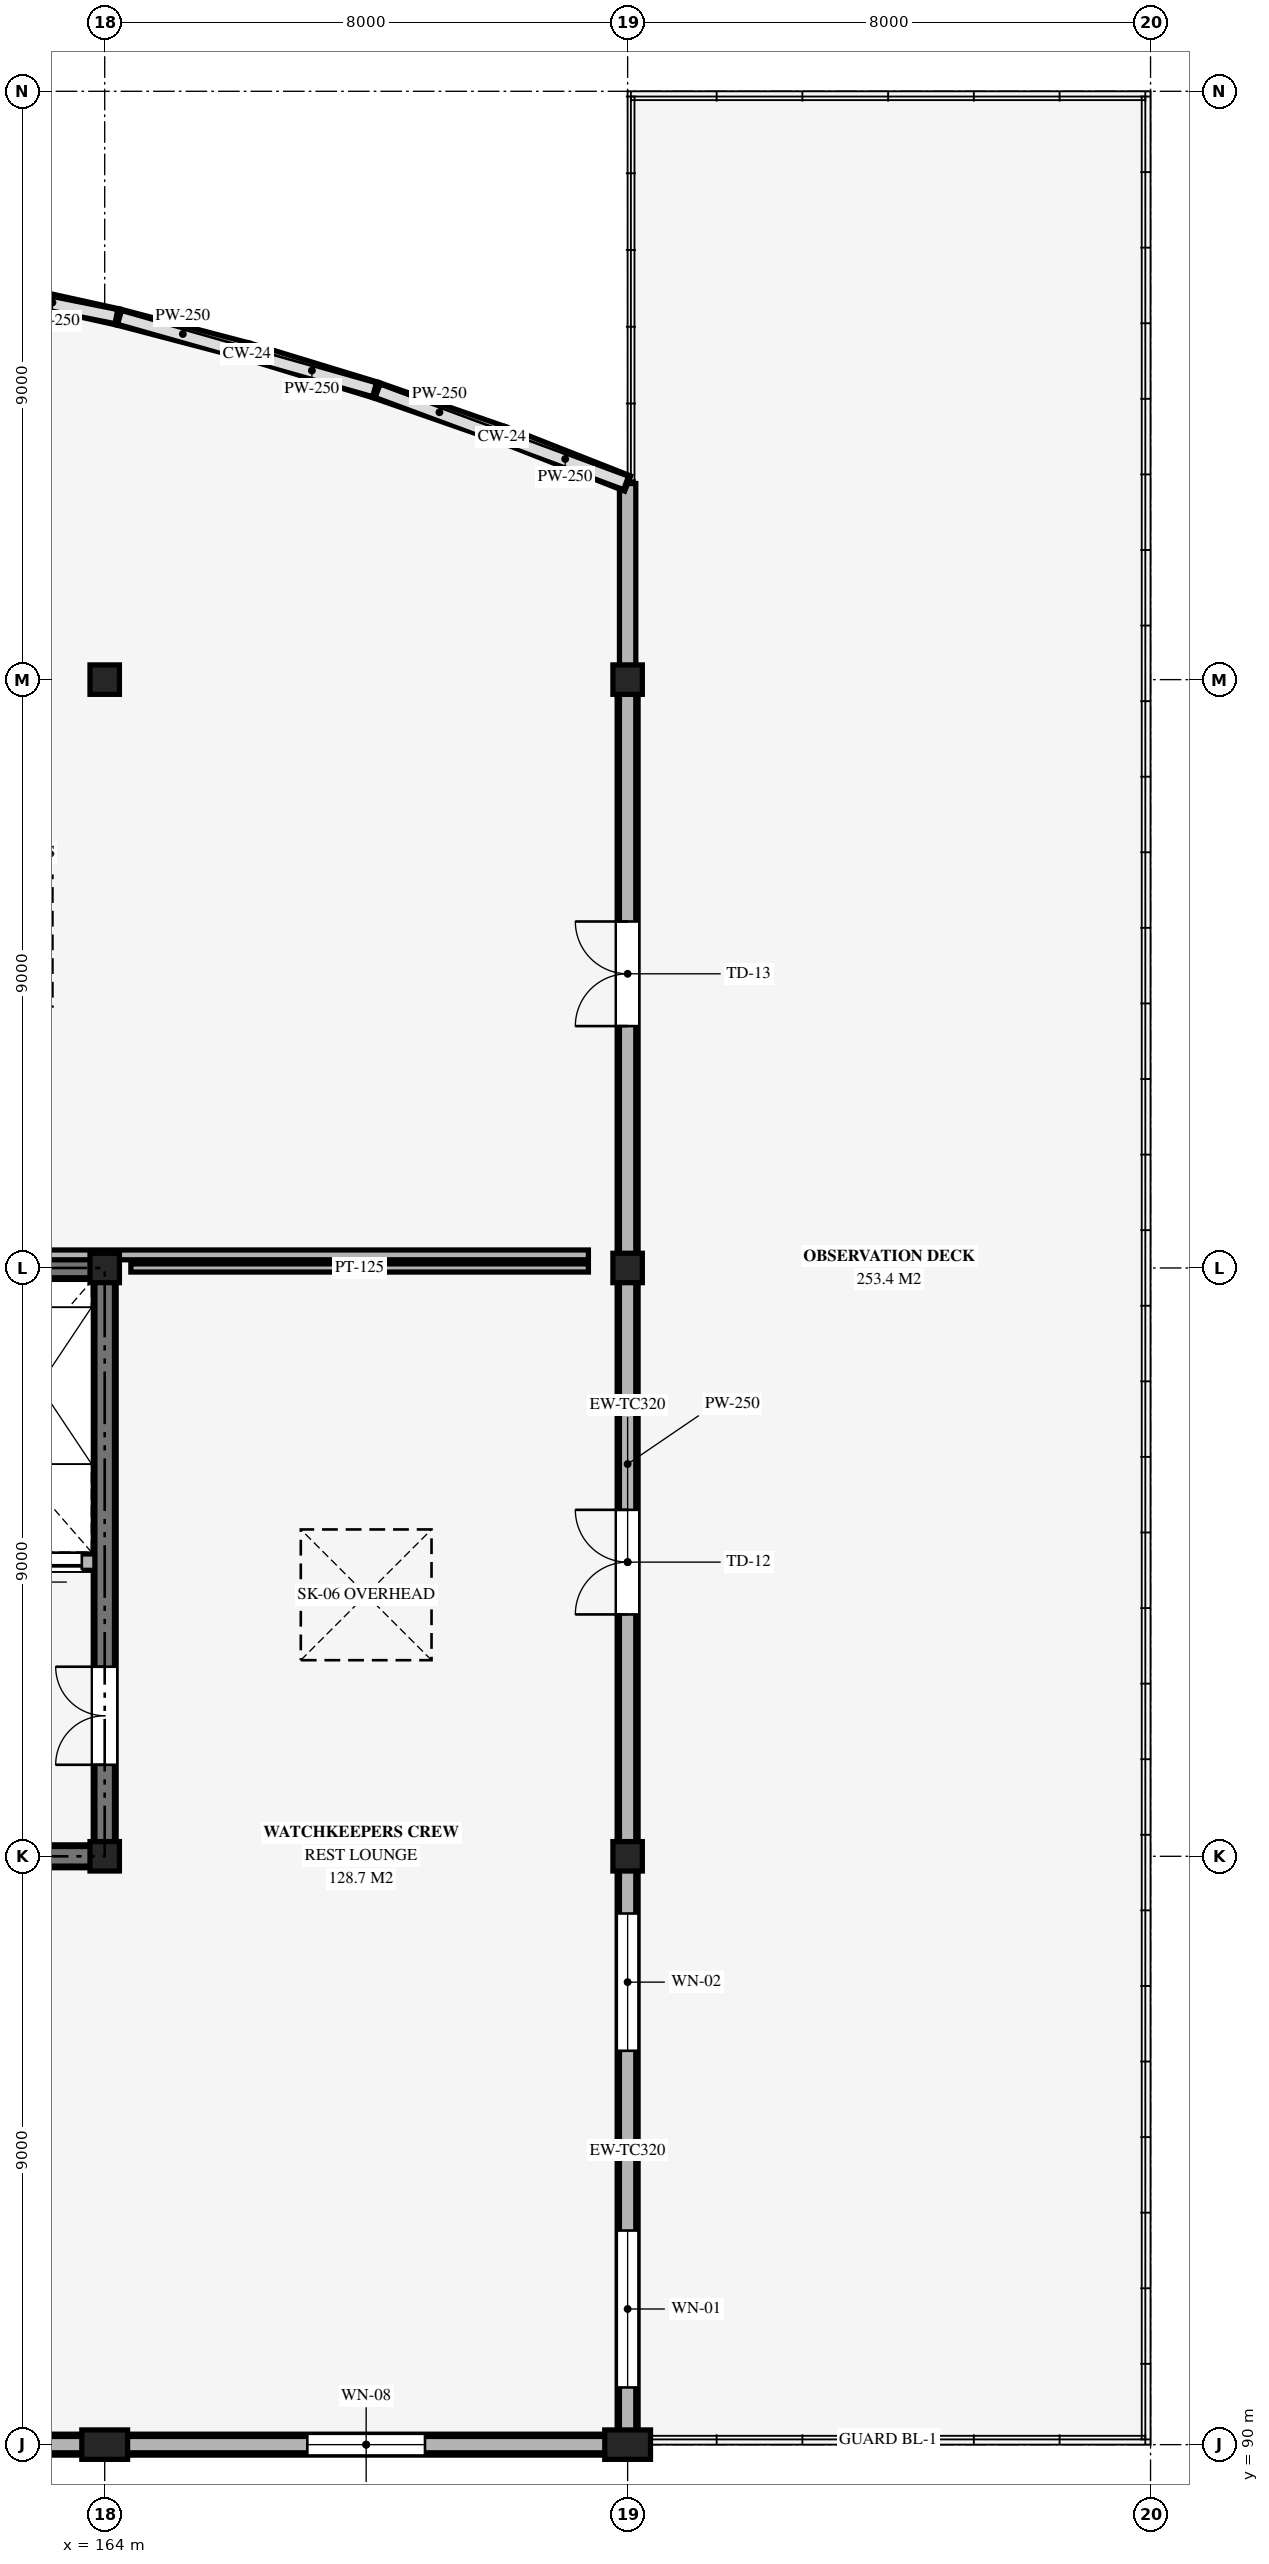
"""IFC4 building model, lengths in metres.
Left out: names, types, materials, properties, quantities, classifications, styles, units other than length and angle.
Written with IfcOpenShell. Run it as: python <this file> out.ifc"""

import sys

from ifc_helpers import new_model, si_unit, direction, frame, frame_2d, origin, origin_2d, place, context, subcontext, project, spatial, rectangle, extrude, element, fill, save


model = new_model("IFC4")
c1 = context("Model", 3, precision=1e-05, world=origin(), true_north=direction((0.0, 1.0)))
c2 = subcontext(c1, "Body", "Model", "MODEL_VIEW")
j1 = project(units=[si_unit("LENGTHUNIT", "METRE"), si_unit("PLANEANGLEUNIT", "RADIAN")], contexts=[c1])
p1 = place(None, origin())
s1 = spatial("IfcSite", under=j1, at=p1, CompositionType="ELEMENT")
p2 = place(p1, origin())
s2 = spatial("IfcBuilding", under=s1, at=p2, CompositionType="ELEMENT")
p3 = place(p2, frame((0.0, 0.0, 23.7)))
s3 = spatial("IfcBuildingStorey", under=s2, at=p3, CompositionType="ELEMENT", Elevation=23.7)
p4 = place(p3, frame((164.0, 90.0, 0.0), z_axis=(0.0, 0.0, 1.0), x_axis=(0.0, 1.0, 0.0)))
e1 = element("IfcColumn", 1, at=p4, inside=s3, PredefinedType="PILASTER", context=c2, shape_type="SweptSolid", body=[
    extrude(rectangle(XDim=0.45, YDim=0.7, at=origin_2d()), origin(), (0.0, 0.0, 1.0), 4.04),
])
for number, where, z_axis, x_axis in (
    (2, (164.0, 99.0, 0.0), (0.0, 0.0, 1.0), (1.0, 0.0, 0.0)),
    (3, (164.0, 108.0, 0.0), (0.0, 0.0, 1.0), (1.0, 0.0, 0.0)),
    (4, (164.0, 117.0, 0.0), (0.0, 0.0, 1.0), (1.0, 0.0, 0.0)),
):
    element("IfcColumn", number, at=place(p3, frame(where, z_axis=z_axis, x_axis=x_axis)), inside=s3, PredefinedType="COLUMN", context=c2, shape_type="SweptSolid", body=[
        extrude(rectangle(XDim=0.45, YDim=0.45, at=origin_2d()), origin(), (0.0, 0.0, 1.0), 4.04),
    ])
p5 = place(p3, frame((172.0, 90.0, 0.0), z_axis=(0.0, 0.0, 1.0), x_axis=(0.0, 1.0, 0.0)))
e5 = element("IfcColumn", 5, at=p5, inside=s3, PredefinedType="PILASTER", context=c2, shape_type="SweptSolid", body=[
    extrude(rectangle(XDim=0.45, YDim=0.7, at=origin_2d()), origin(), (0.0, 0.0, 1.0), 4.04),
])
for number, where, z_axis, x_axis in (
    (6, (172.0, 99.0, 0.0), (0.0, 0.0, 1.0), (1.0, 0.0, 0.0)),
    (7, (172.0, 108.0, 0.0), (0.0, 0.0, 1.0), (1.0, 0.0, 0.0)),
    (8, (172.0, 117.0, 0.0), (0.0, 0.0, 1.0), (1.0, 0.0, 0.0)),
):
    element("IfcColumn", number, at=place(p3, frame(where, z_axis=z_axis, x_axis=x_axis)), inside=s3, PredefinedType="COLUMN", context=c2, shape_type="SweptSolid", body=[
        extrude(rectangle(XDim=0.45, YDim=0.45, at=origin_2d()), origin(), (0.0, 0.0, 1.0), 4.04),
    ])
p6 = place(p3, frame((172.0, 90.225, 0.0), z_axis=(0.0, 0.0, 1.0), x_axis=(0.0, 1.0, 0.0)))
e9 = element("IfcWall", 9, at=p6, inside=s3, PredefinedType="SOLIDWALL", context=c2, shape_type="SweptSolid", body=[
    extrude(rectangle(XDim=8.55, YDim=0.32, at=frame_2d((4.275, 0.0))), origin(), (0.0, 0.0, 1.0), 3.98),
])
p7 = place(p6, frame((0.65, 0.0, 0.95)))
e10 = element("IfcOpeningElement", 10, at=p7, cuts=e9, PredefinedType="OPENING", context=c2, shape_type="SweptSolid", body=[
    extrude(rectangle(XDim=2.4, YDim=2.2, at=frame_2d((1.2, 1.1))), frame((0.0, 0.17, 0.0), z_axis=(0.0, -1.0, 0.0), x_axis=(1.0, 0.0, 0.0)), (0.0, 0.0, 1.0), 0.34),
])
p8 = place(p6, frame((5.8, 0.0, 0.95)))
e11 = element("IfcOpeningElement", 11, at=p8, cuts=e9, PredefinedType="OPENING", context=c2, shape_type="SweptSolid", body=[
    extrude(rectangle(XDim=2.1, YDim=2.2, at=frame_2d((1.05, 1.1))), frame((0.0, 0.17, 0.0), z_axis=(0.0, -1.0, 0.0), x_axis=(1.0, 0.0, 0.0)), (0.0, 0.0, 1.0), 0.34),
])
p9 = place(p3, frame((172.0, 99.225, 0.0), z_axis=(0.0, 0.0, 1.0), x_axis=(0.0, 1.0, 0.0)))
e12 = element("IfcWall", 12, at=p9, inside=s3, PredefinedType="SOLIDWALL", context=c2, shape_type="SweptSolid", body=[
    extrude(rectangle(XDim=8.55, YDim=0.32, at=frame_2d((4.275, 0.0))), origin(), (0.0, 0.0, 1.0), 3.98),
])
p10 = place(p9, frame((3.475, 0.0, 0.0)))
e13 = element("IfcOpeningElement", 13, at=p10, cuts=e12, PredefinedType="OPENING", context=c2, shape_type="SweptSolid", body=[
    extrude(rectangle(XDim=1.6, YDim=2.2, at=frame_2d((0.8, 1.1))), frame((0.0, 0.17, 0.0), z_axis=(0.0, -1.0, 0.0), x_axis=(1.0, 0.0, 0.0)), (0.0, 0.0, 1.0), 0.34),
])
p11 = place(p3, frame((172.0, 108.225, 0.0), z_axis=(0.0, 0.0, 1.0), x_axis=(0.0, 1.0, 0.0)))
e14 = element("IfcWall", 14, at=p11, inside=s3, PredefinedType="SOLIDWALL", context=c2, shape_type="SweptSolid", body=[
    extrude(rectangle(XDim=8.55, YDim=0.32, at=frame_2d((4.275, 0.0))), origin(), (0.0, 0.0, 1.0), 3.98),
])
p12 = place(p11, frame((3.475, 0.0, 0.0)))
e15 = element("IfcOpeningElement", 15, at=p12, cuts=e14, PredefinedType="OPENING", context=c2, shape_type="SweptSolid", body=[
    extrude(rectangle(XDim=1.6, YDim=2.2, at=frame_2d((0.8, 1.1))), frame((0.0, 0.17, 0.0), z_axis=(0.0, -1.0, 0.0), x_axis=(1.0, 0.0, 0.0)), (0.0, 0.0, 1.0), 0.34),
])
p13 = place(p3, frame((163.65, 90.0, 0.0), z_axis=(0.0, 0.0, 1.0), x_axis=(-1.0, 0.0, 0.0)))
e16 = element("IfcWall", 16, at=p13, inside=s3, PredefinedType="SOLIDWALL", context=c2, shape_type="SweptSolid", body=[
    extrude(rectangle(XDim=7.3, YDim=0.32, at=frame_2d((3.65, 0.0))), origin(), (0.0, 0.0, 1.0), 3.98),
])
p14 = place(p13, frame((2.6, 0.0, 1.0)))
e17 = element("IfcOpeningElement", 17, at=p14, cuts=e16, PredefinedType="OPENING", context=c2, shape_type="SweptSolid", body=[
    extrude(rectangle(XDim=2.1, YDim=1.8, at=frame_2d((1.05, 0.9))), frame((0.0, 0.17, 0.0), z_axis=(0.0, -1.0, 0.0), x_axis=(1.0, 0.0, 0.0)), (0.0, 0.0, 1.0), 0.34),
])
p15 = place(p3, frame((171.65, 90.0, 0.0), z_axis=(0.0, 0.0, 1.0), x_axis=(-1.0, 0.0, 0.0)))
e18 = element("IfcWall", 18, at=p15, inside=s3, PredefinedType="SOLIDWALL", context=c2, shape_type="SweptSolid", body=[
    extrude(rectangle(XDim=7.3, YDim=0.32, at=frame_2d((3.65, 0.0))), origin(), (0.0, 0.0, 1.0), 3.98),
])
p16 = place(p15, frame((2.75, 0.0, 1.0)))
e19 = element("IfcOpeningElement", 19, at=p16, cuts=e18, PredefinedType="OPENING", context=c2, shape_type="SweptSolid", body=[
    extrude(rectangle(XDim=1.8, YDim=1.8, at=frame_2d((0.9, 0.9))), frame((0.0, 0.17, 0.0), z_axis=(0.0, -1.0, 0.0), x_axis=(1.0, 0.0, 0.0)), (0.0, 0.0, 1.0), 0.34),
])
p17 = place(p3, frame((120.2, 90.0, 4.2), z_axis=(0.0, 0.0, 1.0), x_axis=(1.0, 0.0, 0.0)))
e20 = element("IfcWall", 20, at=p17, inside=s3, PredefinedType="PARAPET", context=c2, shape_type="SweptSolid", body=[
    extrude(rectangle(XDim=51.8, YDim=0.25, at=frame_2d((25.9, 0.0))), origin(), (0.0, 0.0, 1.0), 1.35),
])
p18 = place(p3, frame((172.0, 90.0, 4.2), z_axis=(0.0, 0.0, 1.0), x_axis=(0.0, 1.0, 0.0)))
e21 = element("IfcWall", 21, at=p18, inside=s3, PredefinedType="PARAPET", context=c2, shape_type="SweptSolid", body=[
    extrude(rectangle(XDim=30.0, YDim=0.25, at=frame_2d((15.0, 0.0))), origin(), (0.0, 0.0, 1.0), 1.35),
])
for number, where, z_axis, x_axis in (
    (22, (172.0, 120.0, 4.2), (0.0, 0.0, 1.0), (-0.93, 0.366, 0.0)),
    (23, (170.09, 120.752, 4.2), (0.0, 0.0, 1.0), (-0.944, 0.329, 0.0)),
):
    element("IfcWall", number, at=place(p3, frame(where, z_axis=z_axis, x_axis=x_axis)), inside=s3, PredefinedType="PARAPET", context=c2, shape_type="SweptSolid", body=[
        extrude(rectangle(XDim=2.052, YDim=0.25, at=frame_2d((1.026, 0.0))), origin(), (0.0, 0.0, 1.0), 1.35),
    ])
p19 = place(p3, frame((168.152, 121.428, 4.2), z_axis=(0.0, 0.0, 1.0), x_axis=(-0.956490827553, 0.291762397864, 0.0)))
e24 = element("IfcWall", 24, at=p19, inside=s3, PredefinedType="PARAPET", context=c2, shape_type="SweptSolid", body=[
    extrude(rectangle(XDim=2.053, YDim=0.25, at=frame_2d((1.027, 0.0))), origin(), (0.0, 0.0, 1.0), 1.35),
])
p20 = place(p3, frame((166.188, 122.027, 4.2), z_axis=(0.0, 0.0, 1.0), x_axis=(-0.967242284582, 0.253855003726, 0.0)))
e25 = element("IfcWall", 25, at=p20, inside=s3, PredefinedType="PARAPET", context=c2, shape_type="SweptSolid", body=[
    extrude(rectangle(XDim=2.052, YDim=0.25, at=frame_2d((1.026, 0.0))), origin(), (0.0, 0.0, 1.0), 1.35),
])
p21 = place(p3, frame((164.203, 122.548, 4.2), z_axis=(0.0, 0.0, 1.0), x_axis=(-0.976560545795, 0.215242886981, 0.0)))
e26 = element("IfcWall", 26, at=p21, inside=s3, PredefinedType="PARAPET", context=c2, shape_type="SweptSolid", body=[
    extrude(rectangle(XDim=2.053, YDim=0.25, at=frame_2d((1.026, 0.0))), origin(), (0.0, 0.0, 1.0), 1.35),
])
for number, where, z_axis, x_axis in (
    (27, (156.0, 99.0, 0.0), (0.0, 0.0, 1.0), (1.0, 0.0, 0.0)),
    (28, (156.0, 108.0, 0.0), (0.0, 0.0, 1.0), (1.0, 0.0, 0.0)),
):
    element("IfcWall", number, at=place(p3, frame(where, z_axis=z_axis, x_axis=x_axis)), inside=s3, PredefinedType="SHEAR", context=c2, shape_type="SweptSolid", body=[
        extrude(rectangle(XDim=8.0, YDim=0.35, at=frame_2d((4.0, 0.0))), origin(), (0.0, 0.0, 1.0), 3.98),
    ])
p22 = place(p3, frame((164.0, 99.0, 0.0), z_axis=(0.0, 0.0, 1.0), x_axis=(0.0, 1.0, 0.0)))
e29 = element("IfcWall", 29, at=p22, inside=s3, PredefinedType="SHEAR", context=c2, shape_type="SweptSolid", body=[
    extrude(rectangle(XDim=9.0, YDim=0.35, at=frame_2d((4.5, 0.0))), origin(), (0.0, 0.0, 1.0), 3.98),
])
p23 = place(p22, frame((1.4, 0.0, 0.0)))
e30 = element("IfcOpeningElement", 30, at=p23, cuts=e29, PredefinedType="OPENING", context=c2, shape_type="SweptSolid", body=[
    extrude(rectangle(XDim=1.5, YDim=2.2, at=frame_2d((0.75, 1.1))), frame((0.0, 0.185, 0.0), z_axis=(0.0, -1.0, 0.0), x_axis=(1.0, 0.0, 0.0)), (0.0, 0.0, 1.0), 0.37),
])
p24 = place(p3, frame((164.0, 103.5, 0.0), z_axis=(0.0, 0.0, 1.0), x_axis=(-1.0, 0.0, 0.0)))
e31 = element("IfcWall", 31, at=p24, inside=s3, PredefinedType="SOLIDWALL", context=c2, shape_type="SweptSolid", body=[
    extrude(rectangle(XDim=4.0, YDim=0.25, at=frame_2d((2.0, 0.0))), origin(), (0.0, 0.0, 1.0), 3.25),
])
p25 = place(p24, frame((0.35, 0.0, 0.0)))
e32 = element("IfcOpeningElement", 32, at=p25, cuts=e31, PredefinedType="OPENING", context=c2, shape_type="SweptSolid", body=[
    extrude(rectangle(XDim=1.3, YDim=2.25, at=frame_2d((0.65, 1.125))), frame((0.0, 0.135, 0.0), z_axis=(0.0, -1.0, 0.0), x_axis=(1.0, 0.0, 0.0)), (0.0, 0.0, 1.0), 0.27),
])
p26 = place(p24, frame((2.25, 0.0, 0.0)))
e33 = element("IfcOpeningElement", 33, at=p26, cuts=e31, PredefinedType="OPENING", context=c2, shape_type="SweptSolid", body=[
    extrude(rectangle(XDim=1.2, YDim=2.2, at=frame_2d((0.6, 1.1))), frame((0.0, 0.135, 0.0), z_axis=(0.0, -1.0, 0.0), x_axis=(1.0, 0.0, 0.0)), (0.0, 0.0, 1.0), 0.27),
])
for number, where, z_axis, x_axis in (
    (34, (156.0, 99.0, 3.98), (0.0, 0.0, 1.0), (1.0, 0.0, 0.0)),
    (35, (156.0, 108.0, 3.98), (0.0, 0.0, 1.0), (1.0, 0.0, 0.0)),
):
    element("IfcWall", number, at=place(p3, frame(where, z_axis=z_axis, x_axis=x_axis)), inside=s3, PredefinedType="SHEAR", context=c2, shape_type="SweptSolid", body=[
        extrude(rectangle(XDim=8.0, YDim=0.3, at=frame_2d((4.0, 0.0))), origin(), (0.0, 0.0, 1.0), 1.84),
    ])
p27 = place(p3, frame((164.0, 99.0, 3.98), z_axis=(0.0, 0.0, 1.0), x_axis=(0.0, 1.0, 0.0)))
e36 = element("IfcWall", 36, at=p27, inside=s3, PredefinedType="SHEAR", context=c2, shape_type="SweptSolid", body=[
    extrude(rectangle(XDim=9.0, YDim=0.3, at=frame_2d((4.5, 0.0))), origin(), (0.0, 0.0, 1.0), 1.84),
])
p28 = place(p3, frame((132.6, 108.2, 0.0), z_axis=(0.0, 0.0, 1.0), x_axis=(1.0, 0.0, 0.0)))
e37 = element("IfcWall", 37, at=p28, inside=s3, PredefinedType="PARTITIONING", context=c2, shape_type="SweptSolid", body=[
    extrude(rectangle(XDim=38.8, YDim=0.15, at=frame_2d((19.4, 0.0))), origin(), (0.0, 0.0, 1.0), 3.25),
])
p29 = place(p28, frame((8.9, 0.0, 0.0)))
e38 = element("IfcOpeningElement", 38, at=p29, cuts=e37, PredefinedType="OPENING", context=c2, shape_type="SweptSolid", body=[
    extrude(rectangle(XDim=1.4, YDim=2.15, at=frame_2d((0.7, 1.075))), frame((0.0, 0.085, 0.0), z_axis=(0.0, -1.0, 0.0), x_axis=(1.0, 0.0, 0.0)), (0.0, 0.0, 1.0), 0.17),
])
p30 = place(p3, frame((164.4, 108.0, 0.0), z_axis=(0.0, 0.0, 1.0), x_axis=(1.0, 0.0, 0.0)))
e39 = element("IfcWall", 39, at=p30, inside=s3, PredefinedType="PARTITIONING", context=c2, shape_type="SweptSolid", body=[
    extrude(rectangle(XDim=7.0, YDim=0.125, at=frame_2d((3.5, 0.0))), origin(), (0.0, 0.0, 1.0), 3.25),
])
p31 = place(p7, origin())
e40 = element("IfcWindow", 40, at=p31, inside=s3, PartitioningType="SINGLE_PANEL", PredefinedType="WINDOW", context=c2, shape_type="SweptSolid", body=[
    extrude(rectangle(XDim=2.4, YDim=2.2, at=frame_2d((1.2, 1.1))), frame((0.0, 0.03, 0.0), z_axis=(0.0, -1.0, 0.0), x_axis=(1.0, 0.0, 0.0)), (0.0, 0.0, 1.0), 0.06),
])
fill(e10, e40)
p32 = place(p8, origin())
e41 = element("IfcWindow", 41, at=p32, inside=s3, PartitioningType="SINGLE_PANEL", PredefinedType="WINDOW", context=c2, shape_type="SweptSolid", body=[
    extrude(rectangle(XDim=2.1, YDim=2.2, at=frame_2d((1.05, 1.1))), frame((0.0, 0.03, 0.0), z_axis=(0.0, -1.0, 0.0), x_axis=(1.0, 0.0, 0.0)), (0.0, 0.0, 1.0), 0.06),
])
fill(e11, e41)
p33 = place(p10, origin())
e42 = element("IfcDoor", 42, at=p33, inside=s3, OperationType="DOUBLE_DOOR_SINGLE_SWING", PredefinedType="DOOR", context=c2, shape_type="SweptSolid", body=[
    extrude(rectangle(XDim=1.6, YDim=2.2, at=frame_2d((0.8, 1.1))), frame((0.0, 0.025, 0.0), z_axis=(0.0, -1.0, 0.0), x_axis=(1.0, 0.0, 0.0)), (0.0, 0.0, 1.0), 0.05),
])
fill(e13, e42)
p34 = place(p12, origin())
e43 = element("IfcDoor", 43, at=p34, inside=s3, OperationType="DOUBLE_DOOR_SINGLE_SWING", PredefinedType="DOOR", context=c2, shape_type="SweptSolid", body=[
    extrude(rectangle(XDim=1.6, YDim=2.2, at=frame_2d((0.8, 1.1))), frame((0.0, 0.025, 0.0), z_axis=(0.0, -1.0, 0.0), x_axis=(1.0, 0.0, 0.0)), (0.0, 0.0, 1.0), 0.05),
])
fill(e15, e43)
p35 = place(p16, origin())
e44 = element("IfcWindow", 44, at=p35, inside=s3, PartitioningType="SINGLE_PANEL", PredefinedType="WINDOW", context=c2, shape_type="SweptSolid", body=[
    extrude(rectangle(XDim=1.8, YDim=1.8, at=frame_2d((0.9, 0.9))), frame((0.0, 0.03, 0.0), z_axis=(0.0, -1.0, 0.0), x_axis=(1.0, 0.0, 0.0)), (0.0, 0.0, 1.0), 0.06),
])
fill(e19, e44)
p36 = place(p2, frame((0.0, 0.0, 27.9)))
p37 = place(p36, frame((0.0, 0.0, -0.22)))
p38 = place(p37, frame((168.0, 103.0, 0.0)))
p39 = place(p38, frame((0.0, 0.0, 0.17)))
e45 = element("IfcWindow", 45, at=p39, inside=s3, PartitioningType="SINGLE_PANEL", PredefinedType="SKYLIGHT", context=c2, shape_type="SweptSolid", body=[
    extrude(rectangle(XDim=2.0, YDim=2.0, at=origin_2d()), origin(), (0.0, 0.0, 1.0), 0.05),
])
p40 = place(p25, origin())
e46 = element("IfcDoor", 46, at=p40, inside=s3, OperationType="DOUBLE_DOOR_SLIDING", PredefinedType="USERDEFINED", context=c2, shape_type="SweptSolid", body=[
    extrude(rectangle(XDim=1.3, YDim=2.25, at=frame_2d((0.65, 1.125))), frame((0.0, 0.025, 0.0), z_axis=(0.0, -1.0, 0.0), x_axis=(1.0, 0.0, 0.0)), (0.0, 0.0, 1.0), 0.05),
])
fill(e32, e46)
p41 = place(p23, origin())
e47 = element("IfcDoor", 47, at=p41, inside=s3, OperationType="DOUBLE_DOOR_SINGLE_SWING", PredefinedType="DOOR", context=c2, shape_type="SweptSolid", body=[
    extrude(rectangle(XDim=1.5, YDim=2.2, at=frame_2d((0.75, 1.1))), frame((0.0, 0.025, 0.0), z_axis=(0.0, -1.0, 0.0), x_axis=(1.0, 0.0, 0.0)), (0.0, 0.0, 1.0), 0.05),
])
fill(e30, e47)
save(model, sys.argv[1])
